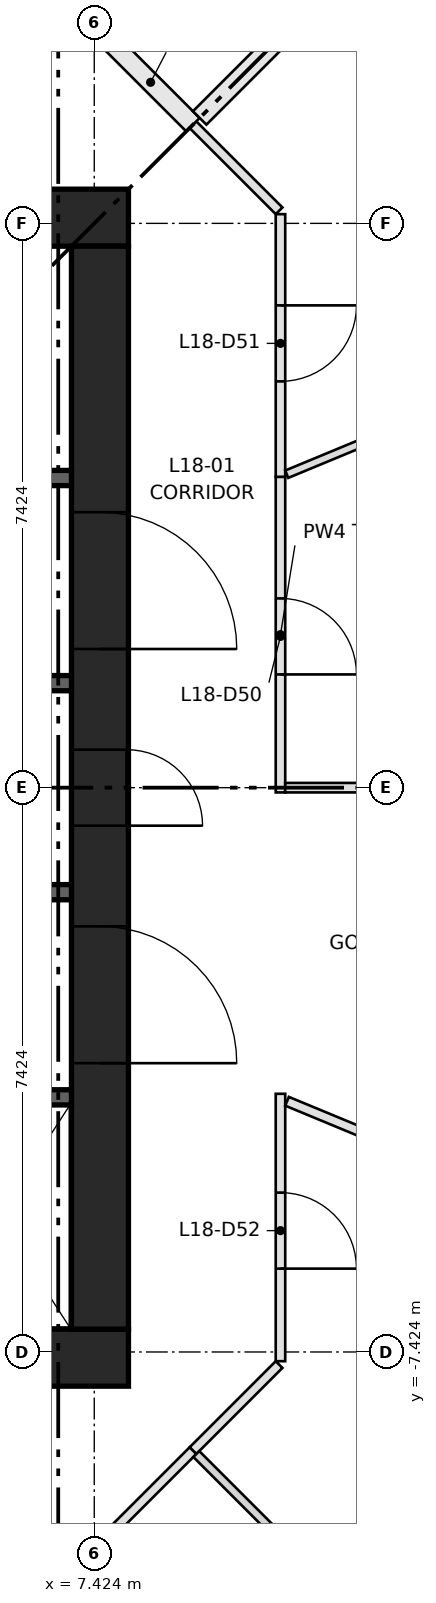
"""IFC4 building model, lengths in metres.
Left out: names, types, materials, properties, quantities, classifications, styles, units other than length and angle.
Written with IfcOpenShell. Run it as: python <this file> out.ifc"""

import sys

from ifc_helpers import new_model, si_unit, direction, frame, frame_2d, origin, place, context, subcontext, project, spatial, rectangle, extrude, element, fill, save


model = new_model("IFC4")
c1 = context("Model", 3, precision=1e-05, world=origin(), true_north=direction((0.0, 1.0)))
c2 = subcontext(c1, "Body", "Model", "MODEL_VIEW")
j1 = project(units=[si_unit("LENGTHUNIT", "METRE"), si_unit("PLANEANGLEUNIT", "RADIAN")], contexts=[c1])
p1 = place(None, origin())
s1 = spatial("IfcSite", under=j1, at=p1, CompositionType="ELEMENT")
p2 = place(p1, origin())
s2 = spatial("IfcBuilding", under=s1, at=p2, CompositionType="ELEMENT")
p3 = place(p2, frame((0.0, 0.0, 72.75)))
s3 = spatial("IfcBuildingStorey", under=s2, at=p3, CompositionType="ELEMENT", Elevation=72.75)
for number, where, z_axis, x_axis in (
    (1, (-7.874, -7.499, 0.0), (0.0, 0.0, 1.0), (1.0, 0.0, 0.0)),
    (2, (-7.874, 7.499, 0.0), (0.0, 0.0, 1.0), (1.0, 0.0, 0.0)),
):
    element("IfcWall", number, at=place(p3, frame(where, z_axis=z_axis, x_axis=x_axis)), inside=s3, PredefinedType="SHEAR", context=c2, shape_type="SweptSolid", body=[
        extrude(rectangle(XDim=15.748, YDim=0.75, at=frame_2d((7.874, 0.0))), origin(), (0.0, 0.0, 1.0), 3.65),
    ])
p4 = place(p3, frame((7.499, -7.124, 0.0), z_axis=(0.0, 0.0, 1.0), x_axis=(0.0, 1.0, 0.0)))
e3 = element("IfcWall", 3, at=p4, inside=s3, PredefinedType="SHEAR", context=c2, shape_type="SweptSolid", body=[
    extrude(rectangle(XDim=14.248, YDim=0.75, at=frame_2d((7.124, 0.0))), origin(), (0.0, 0.0, 1.0), 3.65),
])
p5 = place(p4, frame((6.624, 0.0, 0.0)))
e4 = element("IfcOpeningElement", 4, at=p5, cuts=e3, PredefinedType="OPENING", context=c2, shape_type="SweptSolid", body=[
    extrude(rectangle(XDim=1.0, YDim=2.1, at=frame_2d((0.5, 1.05))), frame((0.0, 0.385, 0.0), z_axis=(0.0, -1.0, 0.0), x_axis=(1.0, 0.0, 0.0)), (0.0, 0.0, 1.0), 0.77),
])
p6 = place(p4, frame((3.5, 0.0, 0.0)))
e5 = element("IfcOpeningElement", 5, at=p6, cuts=e3, PredefinedType="OPENING", context=c2, shape_type="SweptSolid", body=[
    extrude(rectangle(XDim=1.8, YDim=2.1, at=frame_2d((0.9, 1.05))), frame((0.0, 0.385, 0.0), z_axis=(0.0, -1.0, 0.0), x_axis=(1.0, 0.0, 0.0)), (0.0, 0.0, 1.0), 0.77),
])
p7 = place(p4, frame((8.948, 0.0, 0.0)))
e6 = element("IfcOpeningElement", 6, at=p7, cuts=e3, PredefinedType="OPENING", context=c2, shape_type="SweptSolid", body=[
    extrude(rectangle(XDim=1.8, YDim=2.1, at=frame_2d((0.9, 1.05))), frame((0.0, 0.385, 0.0), z_axis=(0.0, -1.0, 0.0), x_axis=(1.0, 0.0, 0.0)), (0.0, 0.0, 1.0), 0.77),
])
p8 = place(p3, frame((-7.124, -4.074, 0.0), z_axis=(0.0, 0.0, 1.0), x_axis=(1.0, 0.0, 0.0)))
e7 = element("IfcWall", 7, at=p8, inside=s3, PredefinedType="SHEAR", context=c2, shape_type="SweptSolid", body=[
    extrude(rectangle(XDim=14.248, YDim=0.2, at=frame_2d((7.124, 0.0))), origin(), (0.0, 0.0, 1.0), 3.3),
])
p9 = place(p8, frame((1.069, 0.0, 0.0)))
e8 = element("IfcOpeningElement", 8, at=p9, cuts=e7, PredefinedType="OPENING", context=c2, shape_type="SweptSolid", body=[
    extrude(rectangle(XDim=1.1, YDim=2.1, at=frame_2d((0.55, 1.05))), frame((0.0, 0.11, 0.0), z_axis=(0.0, -1.0, 0.0), x_axis=(1.0, 0.0, 0.0)), (0.0, 0.0, 1.0), 0.22),
])
p10 = place(p8, frame((4.206, 0.0, 0.0)))
e9 = element("IfcOpeningElement", 9, at=p10, cuts=e7, PredefinedType="OPENING", context=c2, shape_type="SweptSolid", body=[
    extrude(rectangle(XDim=1.1, YDim=2.1, at=frame_2d((0.55, 1.05))), frame((0.0, 0.11, 0.0), z_axis=(0.0, -1.0, 0.0), x_axis=(1.0, 0.0, 0.0)), (0.0, 0.0, 1.0), 0.22),
])
p11 = place(p8, frame((6.808, 0.0, 0.0)))
e10 = element("IfcOpeningElement", 10, at=p11, cuts=e7, PredefinedType="OPENING", context=c2, shape_type="SweptSolid", body=[
    extrude(rectangle(XDim=1.0, YDim=2.1, at=frame_2d((0.5, 1.05))), frame((0.0, 0.11, 0.0), z_axis=(0.0, -1.0, 0.0), x_axis=(1.0, 0.0, 0.0)), (0.0, 0.0, 1.0), 0.22),
])
p12 = place(p8, frame((8.777, 0.0, 0.0)))
e11 = element("IfcOpeningElement", 11, at=p12, cuts=e7, PredefinedType="OPENING", context=c2, shape_type="SweptSolid", body=[
    extrude(rectangle(XDim=1.0, YDim=2.1, at=frame_2d((0.5, 1.05))), frame((0.0, 0.11, 0.0), z_axis=(0.0, -1.0, 0.0), x_axis=(1.0, 0.0, 0.0)), (0.0, 0.0, 1.0), 0.22),
])
p13 = place(p8, frame((10.745, 0.0, 0.0)))
e12 = element("IfcOpeningElement", 12, at=p13, cuts=e7, PredefinedType="OPENING", context=c2, shape_type="SweptSolid", body=[
    extrude(rectangle(XDim=1.0, YDim=2.1, at=frame_2d((0.5, 1.05))), frame((0.0, 0.11, 0.0), z_axis=(0.0, -1.0, 0.0), x_axis=(1.0, 0.0, 0.0)), (0.0, 0.0, 1.0), 0.22),
])
p14 = place(p8, frame((12.714, 0.0, 0.0)))
e13 = element("IfcOpeningElement", 13, at=p14, cuts=e7, PredefinedType="OPENING", context=c2, shape_type="SweptSolid", body=[
    extrude(rectangle(XDim=1.0, YDim=2.1, at=frame_2d((0.5, 1.05))), frame((0.0, 0.11, 0.0), z_axis=(0.0, -1.0, 0.0), x_axis=(1.0, 0.0, 0.0)), (0.0, 0.0, 1.0), 0.22),
])
p15 = place(p3, frame((0.0, 4.074, 0.0), z_axis=(0.0, 0.0, 1.0), x_axis=(1.0, 0.0, 0.0)))
e14 = element("IfcWall", 14, at=p15, inside=s3, PredefinedType="SHEAR", context=c2, shape_type="SweptSolid", body=[
    extrude(rectangle(XDim=7.124, YDim=0.2, at=frame_2d((3.562, 0.0))), origin(), (0.0, 0.0, 1.0), 3.3),
])
p16 = place(p15, frame((0.753, 0.0, 0.0)))
e15 = element("IfcOpeningElement", 15, at=p16, cuts=e14, PredefinedType="OPENING", context=c2, shape_type="SweptSolid", body=[
    extrude(rectangle(XDim=1.0, YDim=2.1, at=frame_2d((0.5, 1.05))), frame((0.0, 0.11, 0.0), z_axis=(0.0, -1.0, 0.0), x_axis=(1.0, 0.0, 0.0)), (0.0, 0.0, 1.0), 0.22),
])
p17 = place(p15, frame((2.685, 0.0, 0.0)))
e16 = element("IfcOpeningElement", 16, at=p17, cuts=e14, PredefinedType="OPENING", context=c2, shape_type="SweptSolid", body=[
    extrude(rectangle(XDim=0.95, YDim=2.1, at=frame_2d((0.475, 1.05))), frame((0.0, 0.11, 0.0), z_axis=(0.0, -1.0, 0.0), x_axis=(1.0, 0.0, 0.0)), (0.0, 0.0, 1.0), 0.22),
])
p18 = place(p15, frame((4.06, 0.0, 0.0)))
e17 = element("IfcOpeningElement", 17, at=p18, cuts=e14, PredefinedType="OPENING", context=c2, shape_type="SweptSolid", body=[
    extrude(rectangle(XDim=1.0, YDim=2.1, at=frame_2d((0.5, 1.05))), frame((0.0, 0.11, 0.0), z_axis=(0.0, -1.0, 0.0), x_axis=(1.0, 0.0, 0.0)), (0.0, 0.0, 1.0), 0.22),
])
p19 = place(p15, frame((5.79, 0.0, 0.0)))
e18 = element("IfcOpeningElement", 18, at=p19, cuts=e14, PredefinedType="OPENING", context=c2, shape_type="SweptSolid", body=[
    extrude(rectangle(XDim=0.8, YDim=2.1, at=frame_2d((0.4, 1.05))), frame((0.0, 0.11, 0.0), z_axis=(0.0, -1.0, 0.0), x_axis=(1.0, 0.0, 0.0)), (0.0, 0.0, 1.0), 0.22),
])
for number, where, z_axis, x_axis in (
    (19, (4.374, -1.375, 0.0), (0.0, 0.0, 1.0), (1.0, 0.0, 0.0)),
    (20, (4.374, 1.375, 0.0), (0.0, 0.0, 1.0), (1.0, 0.0, 0.0)),
):
    element("IfcWall", number, at=place(p3, frame(where, z_axis=z_axis, x_axis=x_axis)), inside=s3, PredefinedType="SHEAR", context=c2, shape_type="SweptSolid", body=[
        extrude(rectangle(XDim=2.75, YDim=0.2, at=frame_2d((1.375, 0.0))), origin(), (0.0, 0.0, 1.0), 3.3),
    ])
p20 = place(p3, frame((9.874, 4.09, 0.0), z_axis=(0.0, 0.0, 1.0), x_axis=(0.0, -1.0, 0.0)))
e21 = element("IfcWall", 21, at=p20, inside=s3, PredefinedType="PARTITIONING", context=c2, shape_type="SweptSolid", body=[
    extrude(rectangle(XDim=4.152, YDim=0.125, at=frame_2d((2.076, 0.0))), origin(), (0.0, 0.0, 1.0), 3.3),
])
p21 = place(p20, frame((1.6, 0.0, 0.0)))
e22 = element("IfcOpeningElement", 22, at=p21, cuts=e21, PredefinedType="OPENING", context=c2, shape_type="SweptSolid", body=[
    extrude(rectangle(XDim=1.0, YDim=2.1, at=frame_2d((0.5, 1.05))), frame((0.0, 0.073, 0.0), z_axis=(0.0, -1.0, 0.0), x_axis=(1.0, 0.0, 0.0)), (0.0, 0.0, 1.0), 0.145),
])
p22 = place(p3, frame((8.722, 8.722, 0.0), z_axis=(0.0, 0.0, 1.0), x_axis=(0.70718294931, -0.707030604857, 0.0)))
e23 = element("IfcWall", 23, at=p22, inside=s3, PredefinedType="PARTITIONING", context=c2, shape_type="SweptSolid", body=[
    extrude(rectangle(XDim=1.603, YDim=0.125, at=frame_2d((0.801, 0.0))), origin(), (0.0, 0.0, 1.0), 3.3),
])
p23 = place(p3, frame((9.874, 7.545, 0.0), z_axis=(0.0, 0.0, 1.0), x_axis=(0.0, -1.0, 0.0)))
e24 = element("IfcWall", 24, at=p23, inside=s3, PredefinedType="PARTITIONING", context=c2, shape_type="SweptSolid", body=[
    extrude(rectangle(XDim=3.455, YDim=0.125, at=frame_2d((1.728, 0.0))), origin(), (0.0, 0.0, 1.0), 3.3),
])
p24 = place(p23, frame((1.2, 0.0, 0.0)))
e25 = element("IfcOpeningElement", 25, at=p24, cuts=e24, PredefinedType="OPENING", context=c2, shape_type="SweptSolid", body=[
    extrude(rectangle(XDim=1.0, YDim=2.1, at=frame_2d((0.5, 1.05))), frame((0.0, 0.073, 0.0), z_axis=(0.0, -1.0, 0.0), x_axis=(1.0, 0.0, 0.0)), (0.0, 0.0, 1.0), 0.145),
])
p25 = place(p3, frame((9.856, -7.589, 0.0), z_axis=(0.0, 0.0, 1.0), x_axis=(-0.70718294931, -0.707030604857, 0.0)))
e26 = element("IfcWall", 26, at=p25, inside=s3, PredefinedType="PARTITIONING", context=c2, shape_type="SweptSolid", body=[
    extrude(rectangle(XDim=1.603, YDim=0.125, at=frame_2d((0.801, 0.0))), origin(), (0.0, 0.0, 1.0), 3.3),
])
p26 = place(p3, frame((9.874, -4.027, 0.0), z_axis=(0.0, 0.0, 1.0), x_axis=(0.0, -1.0, 0.0)))
e27 = element("IfcWall", 27, at=p26, inside=s3, PredefinedType="PARTITIONING", context=c2, shape_type="SweptSolid", body=[
    extrude(rectangle(XDim=3.518, YDim=0.125, at=frame_2d((1.759, 0.0))), origin(), (0.0, 0.0, 1.0), 3.3),
])
p27 = place(p26, frame((1.3, 0.0, 0.0)))
e28 = element("IfcOpeningElement", 28, at=p27, cuts=e27, PredefinedType="OPENING", context=c2, shape_type="SweptSolid", body=[
    extrude(rectangle(XDim=1.0, YDim=2.1, at=frame_2d((0.5, 1.05))), frame((0.0, 0.073, 0.0), z_axis=(0.0, -1.0, 0.0), x_axis=(1.0, 0.0, 0.0)), (0.0, 0.0, 1.0), 0.145),
])
p28 = place(p3, frame((7.608, 9.837, 0.0), z_axis=(0.0, 0.0, 1.0), x_axis=(0.707029353672, -0.707184200224, 0.0)))
e29 = element("IfcWall", 29, at=p28, inside=s3, PredefinedType="PARTITIONING", context=c2, shape_type="SweptSolid", body=[
    extrude(rectangle(XDim=1.577, YDim=0.25, at=frame_2d((0.788, 0.0))), origin(), (0.0, 0.0, 1.0), 3.3),
])
p29 = place(p3, frame((8.722, -8.722, 0.0), z_axis=(0.0, 0.0, 1.0), x_axis=(-0.707030604857, -0.70718294931, 0.0)))
e30 = element("IfcWall", 30, at=p29, inside=s3, PredefinedType="PARTITIONING", context=c2, shape_type="SweptSolid", body=[
    extrude(rectangle(XDim=1.603, YDim=0.125, at=frame_2d((0.801, 0.0))), origin(), (0.0, 0.0, 1.0), 3.3),
])
p30 = place(p3, frame((9.957, 4.124, 0.0), z_axis=(0.0, 0.0, 1.0), x_axis=(0.923858155589, 0.382735036745, 0.0)))
e31 = element("IfcWall", 31, at=p30, inside=s3, PredefinedType="PARTITIONING", context=c2, shape_type="SweptSolid", body=[
    extrude(rectangle(XDim=2.813, YDim=0.105, at=frame_2d((1.406, 0.0))), origin(), (0.0, 0.0, 1.0), 3.3),
])
p31 = place(p3, frame((13.59, 0.0, 0.0), z_axis=(0.0, 0.0, 1.0), x_axis=(-1.0, 0.0, 0.0)))
e32 = element("IfcWall", 32, at=p31, inside=s3, PredefinedType="PARTITIONING", context=c2, shape_type="SweptSolid", body=[
    extrude(rectangle(XDim=3.654, YDim=0.125, at=frame_2d((1.827, 0.0))), origin(), (0.0, 0.0, 1.0), 3.3),
])
p32 = place(p3, frame((12.912, 12.912, 0.0), z_axis=(0.0, 0.0, 1.0), x_axis=(-0.707106781187, -0.707106781187, 0.0)))
e33 = element("IfcWall", 33, at=p32, inside=s3, PredefinedType="PARTITIONING", context=c2, shape_type="SweptSolid", body=[
    extrude(rectangle(XDim=5.8, YDim=0.25, at=frame_2d((2.9, 0.0))), origin(), (0.0, 0.0, 1.0), 3.3),
])
p33 = place(p3, frame((8.767, -8.767, 0.0), z_axis=(0.0, 0.0, 1.0), x_axis=(0.707106781187, -0.707106781187, 0.0)))
e34 = element("IfcWall", 34, at=p33, inside=s3, PredefinedType="PARTITIONING", context=c2, shape_type="SweptSolid", body=[
    extrude(rectangle(XDim=5.862, YDim=0.11, at=frame_2d((2.931, 0.0))), origin(), (0.0, 0.0, 1.0), 3.3),
])
p34 = place(p3, frame((9.96, -4.126, 0.0), z_axis=(0.0, 0.0, 1.0), x_axis=(0.923869574034, -0.382707473372, 0.0)))
e35 = element("IfcWall", 35, at=p34, inside=s3, PredefinedType="PARTITIONING", context=c2, shape_type="SweptSolid", body=[
    extrude(rectangle(XDim=2.809, YDim=0.125, at=frame_2d((1.404, 0.0))), origin(), (0.0, 0.0, 1.0), 3.3),
])
p35 = place(p5, frame((1.0, 0.0, 0.0), z_axis=(0.0, 0.0, 1.0), x_axis=(-1.0, 0.0, 0.0)))
e36 = element("IfcDoor", 36, at=p35, inside=s3, OperationType="SINGLE_SWING_LEFT", PredefinedType="DOOR", context=c2, shape_type="SweptSolid", body=[
    extrude(rectangle(XDim=1.0, YDim=2.1, at=frame_2d((0.5, 1.05))), frame((0.0, 0.375, 0.0), z_axis=(0.0, -1.0, 0.0), x_axis=(1.0, 0.0, 0.0)), (0.0, 0.0, 1.0), 0.05),
])
fill(e4, e36)
p36 = place(p6, frame((1.8, 0.0, 0.0), z_axis=(0.0, 0.0, 1.0), x_axis=(-1.0, 0.0, 0.0)))
e37 = element("IfcDoor", 37, at=p36, inside=s3, OperationType="DOUBLE_DOOR_SINGLE_SWING", PredefinedType="DOOR", context=c2, shape_type="SweptSolid", body=[
    extrude(rectangle(XDim=1.8, YDim=2.1, at=frame_2d((0.9, 1.05))), frame((0.0, 0.025, 0.0), z_axis=(0.0, -1.0, 0.0), x_axis=(1.0, 0.0, 0.0)), (0.0, 0.0, 1.0), 0.05),
])
fill(e5, e37)
p37 = place(p7, frame((1.8, 0.0, 0.0), z_axis=(0.0, 0.0, 1.0), x_axis=(-1.0, 0.0, 0.0)))
e38 = element("IfcDoor", 38, at=p37, inside=s3, OperationType="DOUBLE_DOOR_SINGLE_SWING", PredefinedType="DOOR", context=c2, shape_type="SweptSolid", body=[
    extrude(rectangle(XDim=1.8, YDim=2.1, at=frame_2d((0.9, 1.05))), frame((0.0, 0.025, 0.0), z_axis=(0.0, -1.0, 0.0), x_axis=(1.0, 0.0, 0.0)), (0.0, 0.0, 1.0), 0.05),
])
fill(e6, e38)
p38 = place(p21, origin())
e39 = element("IfcDoor", 39, at=p38, inside=s3, OperationType="SINGLE_SWING_RIGHT", PredefinedType="DOOR", context=c2, shape_type="SweptSolid", body=[
    extrude(rectangle(XDim=1.0, YDim=2.1, at=frame_2d((0.5, 1.05))), frame((0.0, 0.025, 0.0), z_axis=(0.0, -1.0, 0.0), x_axis=(1.0, 0.0, 0.0)), (0.0, 0.0, 1.0), 0.05),
])
fill(e22, e39)
p39 = place(p24, origin())
e40 = element("IfcDoor", 40, at=p39, inside=s3, OperationType="SINGLE_SWING_LEFT", PredefinedType="DOOR", context=c2, shape_type="SweptSolid", body=[
    extrude(rectangle(XDim=1.0, YDim=2.1, at=frame_2d((0.5, 1.05))), frame((0.0, 0.025, 0.0), z_axis=(0.0, -1.0, 0.0), x_axis=(1.0, 0.0, 0.0)), (0.0, 0.0, 1.0), 0.05),
])
fill(e25, e40)
p40 = place(p27, origin())
e41 = element("IfcDoor", 41, at=p40, inside=s3, OperationType="SINGLE_SWING_RIGHT", PredefinedType="DOOR", context=c2, shape_type="SweptSolid", body=[
    extrude(rectangle(XDim=1.0, YDim=2.1, at=frame_2d((0.5, 1.05))), frame((0.0, 0.025, 0.0), z_axis=(0.0, -1.0, 0.0), x_axis=(1.0, 0.0, 0.0)), (0.0, 0.0, 1.0), 0.05),
])
fill(e28, e41)
save(model, sys.argv[1])
